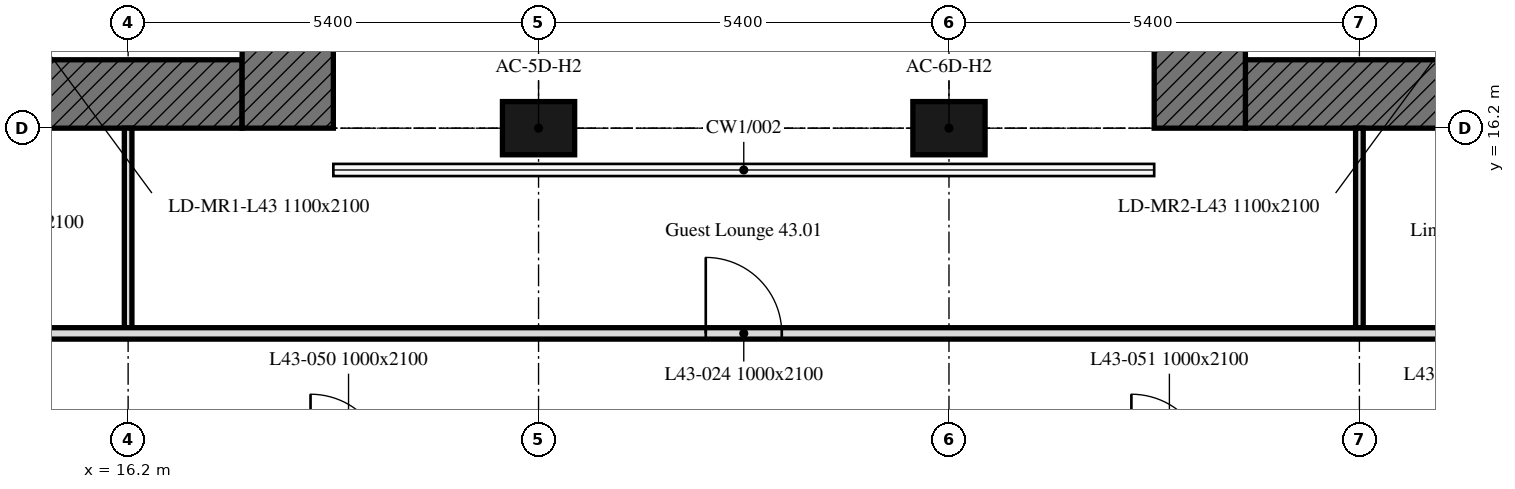
"""IFC4 building model, lengths in metres.
Left out: names, types, materials, properties, quantities, classifications, styles, units other than length and angle.
Written with IfcOpenShell. Run it as: python <this file> out.ifc"""

import sys

from ifc_helpers import new_model, si_unit, direction, frame, frame_2d, origin, origin_2d, place, context, subcontext, project, spatial, rectangle, extrude, element, fill, save


model = new_model("IFC4")
c1 = context("Model", 3, precision=1e-05, world=origin(), true_north=direction((0.0, 1.0)))
c2 = subcontext(c1, "Body", "Model", "MODEL_VIEW")
j1 = project(units=[si_unit("LENGTHUNIT", "METRE"), si_unit("PLANEANGLEUNIT", "RADIAN")], contexts=[c1])
p1 = place(None, origin())
s1 = spatial("IfcSite", under=j1, at=p1, CompositionType="ELEMENT")
p2 = place(p1, origin())
s2 = spatial("IfcBuilding", under=s1, at=p2, CompositionType="ELEMENT")
p3 = place(p2, frame((0.0, 0.0, 180.7)))
s3 = spatial("IfcBuildingStorey", under=s2, at=p3, CompositionType="ELEMENT", Elevation=180.7)
for number, where, z_axis, x_axis in (
    (1, (21.6, 16.2, 0.0), (0.0, 0.0, 1.0), (1.0, 0.0, 0.0)),
    (2, (27.0, 16.2, 0.0), (0.0, 0.0, 1.0), (1.0, 0.0, 0.0)),
):
    element("IfcColumn", number, at=place(p3, frame(where, z_axis=z_axis, x_axis=x_axis)), inside=s3, PredefinedType="COLUMN", context=c2, shape_type="SweptSolid", body=[
        extrude(rectangle(XDim=0.95, YDim=0.7, at=origin_2d()), origin(), (0.0, 0.0, 1.0), 3.0),
    ])
p4 = place(p3, frame((17.7, 16.65, 0.0), z_axis=(0.0, 0.0, 1.0), x_axis=(-1.0, 0.0, 0.0)))
e3 = element("IfcWall", 3, at=p4, inside=s3, PredefinedType="SOLIDWALL", context=c2, shape_type="SweptSolid", body=[
    extrude(rectangle(XDim=11.1, YDim=0.9, at=frame_2d((5.55, 0.0))), origin(), (0.0, 0.0, 1.0), 3.0),
])
p5 = place(p4, frame((5.55, 0.0, 0.0)))
e4 = element("IfcOpeningElement", 4, at=p5, cuts=e3, PredefinedType="OPENING", context=c2, shape_type="SweptSolid", body=[
    extrude(rectangle(XDim=2.0, YDim=2.4, at=frame_2d((1.0, 1.2))), frame((0.0, 0.45, 0.0), z_axis=(0.0, -1.0, 0.0), x_axis=(1.0, 0.0, 0.0)), (0.0, 0.0, 1.0), 0.9),
])
p6 = place(p3, frame((18.3, 32.4, 0.0), z_axis=(0.0, 0.0, 1.0), x_axis=(0.0, -1.0, 0.0)))
e5 = element("IfcWall", 5, at=p6, inside=s3, PredefinedType="SOLIDWALL", context=c2, shape_type="SweptSolid", body=[
    extrude(rectangle(XDim=16.2, YDim=1.2, at=frame_2d((8.1, 0.0))), origin(), (0.0, 0.0, 1.0), 3.0),
])
p7 = place(p3, frame((42.0, 16.65, 0.0), z_axis=(0.0, 0.0, 1.0), x_axis=(-1.0, 0.0, 0.0)))
e6 = element("IfcWall", 6, at=p7, inside=s3, PredefinedType="SOLIDWALL", context=c2, shape_type="SweptSolid", body=[
    extrude(rectangle(XDim=11.1, YDim=0.9, at=frame_2d((5.55, 0.0))), origin(), (0.0, 0.0, 1.0), 3.0),
])
p8 = place(p7, frame((3.55, 0.0, 0.0)))
e7 = element("IfcOpeningElement", 7, at=p8, cuts=e6, PredefinedType="OPENING", context=c2, shape_type="SweptSolid", body=[
    extrude(rectangle(XDim=2.0, YDim=2.4, at=frame_2d((1.0, 1.2))), frame((0.0, 0.45, 0.0), z_axis=(0.0, -1.0, 0.0), x_axis=(1.0, 0.0, 0.0)), (0.0, 0.0, 1.0), 0.9),
])
p9 = place(p3, frame((30.3, 16.2, 0.0), z_axis=(0.0, 0.0, 1.0), x_axis=(0.0, 1.0, 0.0)))
e8 = element("IfcWall", 8, at=p9, inside=s3, PredefinedType="SOLIDWALL", context=c2, shape_type="SweptSolid", body=[
    extrude(rectangle(XDim=16.2, YDim=1.2, at=frame_2d((8.1, 0.0))), origin(), (0.0, 0.0, 1.0), 3.0),
])
for number, where, z_axis, x_axis in (
    (9, (16.2, 16.2, 0.0), (0.0, 0.0, 1.0), (0.0, -1.0, 0.0)),
    (10, (32.4, 13.575, 0.0), (0.0, 0.0, 1.0), (0.0, 1.0, 0.0)),
):
    element("IfcWall", number, at=place(p3, frame(where, z_axis=z_axis, x_axis=x_axis)), inside=s3, PredefinedType="PARTITIONING", context=c2, shape_type="SweptSolid", body=[
        extrude(rectangle(XDim=2.625, YDim=0.1, at=frame_2d((1.312, 0.0))), origin(), (0.0, 0.0, 1.0), 3.0),
    ])
p10 = place(p3, frame((6.151, 13.5, 0.0), z_axis=(0.0, 0.0, 1.0), x_axis=(1.0, 0.0, 0.0)))
e11 = element("IfcWall", 11, at=p10, inside=s3, PredefinedType="PARTITIONING", context=c2, shape_type="SweptSolid", body=[
    extrude(rectangle(XDim=36.974, YDim=0.15, at=frame_2d((18.487, 0.0))), origin(), (0.0, 0.0, 1.0), 3.0),
])
p11 = place(p10, frame((17.649, 0.0, 0.0)))
e12 = element("IfcOpeningElement", 12, at=p11, cuts=e11, PredefinedType="OPENING", context=c2, shape_type="SweptSolid", body=[
    extrude(rectangle(XDim=1.0, YDim=2.1, at=frame_2d((0.5, 1.05))), frame((0.0, 0.075, 0.0), z_axis=(0.0, -1.0, 0.0), x_axis=(1.0, 0.0, 0.0)), (0.0, 0.0, 1.0), 0.15),
])
p12 = place(p10, frame((2.029, 0.0, 0.0)))
e13 = element("IfcOpeningElement", 13, at=p12, cuts=e11, PredefinedType="OPENING", context=c2, shape_type="SweptSolid", body=[
    extrude(rectangle(XDim=1.0, YDim=2.1, at=frame_2d((0.5, 1.05))), frame((0.0, 0.075, 0.0), z_axis=(0.0, -1.0, 0.0), x_axis=(1.0, 0.0, 0.0)), (0.0, 0.0, 1.0), 0.15),
])
p13 = place(p10, frame((27.374, 0.0, 0.0)))
e14 = element("IfcOpeningElement", 14, at=p13, cuts=e11, PredefinedType="OPENING", context=c2, shape_type="SweptSolid", body=[
    extrude(rectangle(XDim=1.0, YDim=2.1, at=frame_2d((0.5, 1.05))), frame((0.0, 0.075, 0.0), z_axis=(0.0, -1.0, 0.0), x_axis=(1.0, 0.0, 0.0)), (0.0, 0.0, 1.0), 0.15),
])
p14 = place(p10, frame((34.574, 0.0, 0.0)))
e15 = element("IfcOpeningElement", 15, at=p14, cuts=e11, PredefinedType="OPENING", context=c2, shape_type="SweptSolid", body=[
    extrude(rectangle(XDim=1.0, YDim=2.1, at=frame_2d((0.5, 1.05))), frame((0.0, 0.075, 0.0), z_axis=(0.0, -1.0, 0.0), x_axis=(1.0, 0.0, 0.0)), (0.0, 0.0, 1.0), 0.15),
])
p15 = place(p10, frame((7.924, 0.0, 0.0)))
e16 = element("IfcOpeningElement", 16, at=p15, cuts=e11, PredefinedType="OPENING", context=c2, shape_type="SweptSolid", body=[
    extrude(rectangle(XDim=1.0, YDim=2.1, at=frame_2d((0.5, 1.05))), frame((0.0, 0.075, 0.0), z_axis=(0.0, -1.0, 0.0), x_axis=(1.0, 0.0, 0.0)), (0.0, 0.0, 1.0), 0.15),
])
p16 = place(p10, frame((4.699, 0.0, 0.0)))
e17 = element("IfcOpeningElement", 17, at=p16, cuts=e11, PredefinedType="OPENING", context=c2, shape_type="SweptSolid", body=[
    extrude(rectangle(XDim=1.8, YDim=2.4, at=frame_2d((0.9, 1.2))), frame((0.0, 0.075, 0.0), z_axis=(0.0, -1.0, 0.0), x_axis=(1.0, 0.0, 0.0)), (0.0, 0.0, 1.0), 0.15),
])
p17 = place(p10, frame((29.799, 0.0, 0.0)))
e18 = element("IfcOpeningElement", 18, at=p17, cuts=e11, PredefinedType="OPENING", context=c2, shape_type="SweptSolid", body=[
    extrude(rectangle(XDim=1.8, YDim=2.4, at=frame_2d((0.9, 1.2))), frame((0.0, 0.075, 0.0), z_axis=(0.0, -1.0, 0.0), x_axis=(1.0, 0.0, 0.0)), (0.0, 0.0, 1.0), 0.15),
])
p18 = place(p11, origin())
e19 = element("IfcDoor", 19, at=p18, inside=s3, OperationType="SINGLE_SWING_RIGHT", PredefinedType="DOOR", context=c2, shape_type="SweptSolid", body=[
    extrude(rectangle(XDim=1.0, YDim=2.1, at=frame_2d((0.5, 1.05))), frame((0.0, 0.025, 0.0), z_axis=(0.0, -1.0, 0.0), x_axis=(1.0, 0.0, 0.0)), (0.0, 0.0, 1.0), 0.05),
])
fill(e12, e19)
save(model, sys.argv[1])
